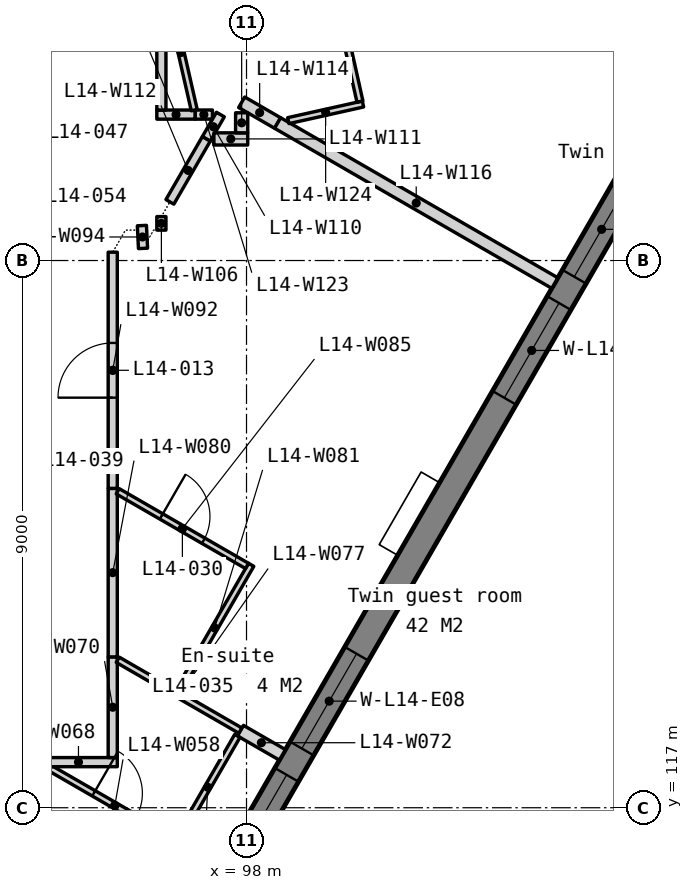
"""IFC4 building model, lengths in metres.
Left out: names, types, materials, properties, quantities, classifications, styles, units other than length and angle.
Written with IfcOpenShell. Run it as: python <this file> out.ifc"""

import sys

from ifc_helpers import new_model, si_unit, direction, frame, frame_2d, origin, place, context, subcontext, project, spatial, polyline, rectangle, outline, extrude, element, fill, save


model = new_model("IFC4")
c1 = context("Model", 3, precision=1e-05, world=origin(), true_north=direction((0.0, 1.0)))
c2 = subcontext(c1, "Body", "Model", "MODEL_VIEW")
j1 = project(units=[si_unit("LENGTHUNIT", "METRE"), si_unit("PLANEANGLEUNIT", "RADIAN")], contexts=[c1])
p1 = place(None, origin())
s1 = spatial("IfcSite", under=j1, at=p1, CompositionType="ELEMENT")
p2 = place(p1, origin())
s2 = spatial("IfcBuilding", under=s1, at=p2, CompositionType="ELEMENT")
p3 = place(p2, frame((0.0, 0.0, 63.0)))
s3 = spatial("IfcBuildingStorey", under=s2, at=p3, CompositionType="ELEMENT", Elevation=63.0)
p4 = place(p3, frame((0.0, 0.0, -0.15)))
e1 = element("IfcWall", 1, at=p4, inside=s3, PredefinedType="SOLIDWALL", context=c2, shape_type="SweptSolid", body=[
    extrude(outline(polyline([(105.7, 129.284), (105.31, 129.509), (105.18, 129.284), (102.14, 134.55), (102.4, 134.55), (102.4, 135.0), (105.7, 129.284)])), origin(), (0.0, 0.0, 1.0), 3.5),
])
p5 = place(p3, frame((83.105, 90.599, -0.15), z_axis=(0.0, 0.0, 1.0), x_axis=(0.499999201451, 0.866025864826, 0.0)))
e2 = element("IfcWall", 2, at=p5, inside=s3, PredefinedType="SOLIDWALL", context=c2, shape_type="SweptSolid", body=[
    extrude(outline(polyline([(44.8, 0.0), (44.8, 3.5), (0.0, 3.5), (0.0, 0.0), (44.8, 0.0)])), frame((0.0, 0.225, 0.0), z_axis=(0.0, -1.0, 0.0), x_axis=(1.0, 0.0, 0.0)), (0.0, 0.0, 1.0), 0.45),
])
p6 = place(p5, frame((2.43, 0.0, 1.05)))
e3 = element("IfcOpeningElement", 3, at=p6, cuts=e2, PredefinedType="OPENING", context=c2, shape_type="SweptSolid", body=[
    extrude(rectangle(XDim=1.8, YDim=1.5, at=frame_2d((0.9, 0.75))), frame((0.0, 0.235, 0.0), z_axis=(0.0, -1.0, 0.0), x_axis=(1.0, 0.0, 0.0)), (0.0, 0.0, 1.0), 0.47),
])
p7 = place(p5, frame((4.73, 0.0, 1.05)))
e4 = element("IfcOpeningElement", 4, at=p7, cuts=e2, PredefinedType="OPENING", context=c2, shape_type="SweptSolid", body=[
    extrude(rectangle(XDim=1.8, YDim=1.5, at=frame_2d((0.9, 0.75))), frame((0.0, 0.235, 0.0), z_axis=(0.0, -1.0, 0.0), x_axis=(1.0, 0.0, 0.0)), (0.0, 0.0, 1.0), 0.47),
])
p8 = place(p5, frame((11.39, 0.0, 1.05)))
e5 = element("IfcOpeningElement", 5, at=p8, cuts=e2, PredefinedType="OPENING", context=c2, shape_type="SweptSolid", body=[
    extrude(rectangle(XDim=1.8, YDim=1.5, at=frame_2d((0.9, 0.75))), frame((0.0, 0.235, 0.0), z_axis=(0.0, -1.0, 0.0), x_axis=(1.0, 0.0, 0.0)), (0.0, 0.0, 1.0), 0.47),
])
p9 = place(p5, frame((13.69, 0.0, 1.05)))
e6 = element("IfcOpeningElement", 6, at=p9, cuts=e2, PredefinedType="OPENING", context=c2, shape_type="SweptSolid", body=[
    extrude(rectangle(XDim=1.8, YDim=1.5, at=frame_2d((0.9, 0.75))), frame((0.0, 0.235, 0.0), z_axis=(0.0, -1.0, 0.0), x_axis=(1.0, 0.0, 0.0)), (0.0, 0.0, 1.0), 0.47),
])
p10 = place(p5, frame((20.35, 0.0, 1.05)))
e7 = element("IfcOpeningElement", 7, at=p10, cuts=e2, PredefinedType="OPENING", context=c2, shape_type="SweptSolid", body=[
    extrude(rectangle(XDim=1.8, YDim=1.5, at=frame_2d((0.9, 0.75))), frame((0.0, 0.235, 0.0), z_axis=(0.0, -1.0, 0.0), x_axis=(1.0, 0.0, 0.0)), (0.0, 0.0, 1.0), 0.47),
])
p11 = place(p5, frame((22.65, 0.0, 1.05)))
e8 = element("IfcOpeningElement", 8, at=p11, cuts=e2, PredefinedType="OPENING", context=c2, shape_type="SweptSolid", body=[
    extrude(rectangle(XDim=1.8, YDim=1.5, at=frame_2d((0.9, 0.75))), frame((0.0, 0.235, 0.0), z_axis=(0.0, -1.0, 0.0), x_axis=(1.0, 0.0, 0.0)), (0.0, 0.0, 1.0), 0.47),
])
p12 = place(p5, frame((29.31, 0.0, 1.05)))
e9 = element("IfcOpeningElement", 9, at=p12, cuts=e2, PredefinedType="OPENING", context=c2, shape_type="SweptSolid", body=[
    extrude(rectangle(XDim=1.8, YDim=1.5, at=frame_2d((0.9, 0.75))), frame((0.0, 0.235, 0.0), z_axis=(0.0, -1.0, 0.0), x_axis=(1.0, 0.0, 0.0)), (0.0, 0.0, 1.0), 0.47),
])
p13 = place(p5, frame((31.61, 0.0, 1.05)))
e10 = element("IfcOpeningElement", 10, at=p13, cuts=e2, PredefinedType="OPENING", context=c2, shape_type="SweptSolid", body=[
    extrude(rectangle(XDim=1.8, YDim=1.5, at=frame_2d((0.9, 0.75))), frame((0.0, 0.235, 0.0), z_axis=(0.0, -1.0, 0.0), x_axis=(1.0, 0.0, 0.0)), (0.0, 0.0, 1.0), 0.47),
])
p14 = place(p5, frame((38.27, 0.0, 1.05)))
e11 = element("IfcOpeningElement", 11, at=p14, cuts=e2, PredefinedType="OPENING", context=c2, shape_type="SweptSolid", body=[
    extrude(rectangle(XDim=1.8, YDim=1.5, at=frame_2d((0.9, 0.75))), frame((0.0, 0.235, 0.0), z_axis=(0.0, -1.0, 0.0), x_axis=(1.0, 0.0, 0.0)), (0.0, 0.0, 1.0), 0.47),
])
p15 = place(p5, frame((40.57, 0.0, 1.05)))
e12 = element("IfcOpeningElement", 12, at=p15, cuts=e2, PredefinedType="OPENING", context=c2, shape_type="SweptSolid", body=[
    extrude(rectangle(XDim=1.8, YDim=1.5, at=frame_2d((0.9, 0.75))), frame((0.0, 0.235, 0.0), z_axis=(0.0, -1.0, 0.0), x_axis=(1.0, 0.0, 0.0)), (0.0, 0.0, 1.0), 0.47),
])
p16 = place(p3, frame((0.0, 0.0, -0.15)))
e13 = element("IfcWall", 13, at=p16, inside=s3, PredefinedType="SOLIDWALL", context=c2, shape_type="SweptSolid", body=[
    extrude(outline(polyline([(105.7, 129.284), (106.507, 134.131), (102.4, 135.0), (105.7, 129.284)])), origin(), (0.0, 0.0, 1.0), 3.5),
])
p17 = place(p3, frame((90.751, 117.223, 0.0), z_axis=(0.0, 0.0, 1.0), x_axis=(0.866015162859, -0.500017737384, 0.0)))
e14 = element("IfcWall", 14, at=p17, inside=s3, PredefinedType="PARTITIONING", context=c2, shape_type="SweptSolid", body=[
    extrude(rectangle(XDim=6.465, YDim=0.2, at=frame_2d((3.232, 0.0))), origin(), (0.0, 0.0, 1.0), 3.35),
])
p18 = place(p3, frame((94.775, 117.647, 0.0), z_axis=(0.0, 0.0, 1.0), x_axis=(0.86604092097, -0.499973122483, 0.0)))
e15 = element("IfcWall", 15, at=p18, inside=s3, PredefinedType="PARTITIONING", context=c2, shape_type="SweptSolid", body=[
    extrude(rectangle(XDim=2.445, YDim=0.1, at=frame_2d((1.223, 0.0))), origin(), (0.0, 0.0, 1.0), 3.35),
])
p19 = place(p18, frame((0.823, 0.0, 0.0)))
e16 = element("IfcOpeningElement", 16, at=p19, cuts=e15, PredefinedType="OPENING", context=c2, shape_type="SweptSolid", body=[
    extrude(rectangle(XDim=0.8, YDim=2.1, at=frame_2d((0.4, 1.05))), frame((0.0, 0.06, 0.0), z_axis=(0.0, -1.0, 0.0), x_axis=(1.0, 0.0, 0.0)), (0.0, 0.0, 1.0), 0.12),
])
p20 = place(p3, frame((94.598, 117.75, 0.0), z_axis=(0.0, 0.0, 1.0), x_axis=(1.0, 0.0, 0.0)))
e17 = element("IfcWall", 17, at=p20, inside=s3, PredefinedType="PARTITIONING", context=c2, shape_type="SweptSolid", body=[
    extrude(rectangle(XDim=1.277, YDim=0.15, at=frame_2d((0.639, 0.0))), origin(), (0.0, 0.0, 1.0), 3.35),
])
p21 = place(p3, frame((95.8, 117.825, 0.0), z_axis=(0.0, 0.0, 1.0), x_axis=(0.0, 1.0, 0.0)))
e18 = element("IfcWall", 18, at=p21, inside=s3, PredefinedType="PARTITIONING", context=c2, shape_type="SweptSolid", body=[
    extrude(rectangle(XDim=1.656, YDim=0.15, at=frame_2d((0.828, 0.0))), origin(), (0.0, 0.0, 1.0), 3.35),
])
p22 = place(p3, frame((97.9, 118.269, 0.0), z_axis=(0.0, 0.0, 1.0), x_axis=(0.866068339032, -0.499925626596, 0.0)))
e19 = element("IfcWall", 19, at=p22, inside=s3, PredefinedType="PARTITIONING", context=c2, shape_type="SweptSolid", body=[
    extrude(rectangle(XDim=0.797, YDim=0.2, at=frame_2d((0.399, 0.0))), origin(), (0.0, 0.0, 1.0), 3.35),
])
p23 = place(p3, frame((96.875, 116.493, 0.0), z_axis=(0.0, 0.0, 1.0), x_axis=(0.500043961785, 0.866000020948, 0.0)))
e20 = element("IfcWall", 20, at=p23, inside=s3, PredefinedType="PARTITIONING", context=c2, shape_type="SweptSolid", body=[
    extrude(rectangle(XDim=1.95, YDim=0.1, at=frame_2d((0.975, 0.0))), origin(), (0.0, 0.0, 1.0), 3.35),
])
p24 = place(p3, frame((95.882, 119.433, 0.0), z_axis=(0.0, 0.0, 1.0), x_axis=(0.866009305107, -0.50002788269, 0.0)))
e21 = element("IfcWall", 21, at=p24, inside=s3, PredefinedType="PARTITIONING", context=c2, shape_type="SweptSolid", body=[
    extrude(rectangle(XDim=2.329, YDim=0.1, at=frame_2d((1.165, 0.0))), origin(), (0.0, 0.0, 1.0), 3.35),
])
p25 = place(p3, frame((95.8, 119.481, 0.0), z_axis=(0.0, 0.0, 1.0), x_axis=(0.0, 1.0, 0.0)))
e22 = element("IfcWall", 22, at=p25, inside=s3, PredefinedType="PARTITIONING", context=c2, shape_type="SweptSolid", body=[
    extrude(rectangle(XDim=2.771, YDim=0.15, at=frame_2d((1.386, 0.0))), origin(), (0.0, 0.0, 1.0), 3.35),
])
p26 = place(p3, frame((96.877, 118.917, 0.0), z_axis=(0.0, 0.0, 1.0), x_axis=(0.500001309137, 0.866024647952, 0.0)))
e23 = element("IfcWall", 23, at=p26, inside=s3, PredefinedType="PARTITIONING", context=c2, shape_type="SweptSolid", body=[
    extrude(rectangle(XDim=2.4, YDim=0.1, at=frame_2d((1.2, 0.0))), origin(), (0.0, 0.0, 1.0), 3.35),
])
p27 = place(p3, frame((95.882, 122.205, 0.0), z_axis=(0.0, 0.0, 1.0), x_axis=(0.866006720078, -0.500032359733, 0.0)))
e24 = element("IfcWall", 24, at=p27, inside=s3, PredefinedType="PARTITIONING", context=c2, shape_type="SweptSolid", body=[
    extrude(rectangle(XDim=2.455, YDim=0.1, at=frame_2d((1.228, 0.0))), origin(), (0.0, 0.0, 1.0), 3.35),
])
p28 = place(p27, frame((0.827, 0.0, 0.0)))
e25 = element("IfcOpeningElement", 25, at=p28, cuts=e24, PredefinedType="OPENING", context=c2, shape_type="SweptSolid", body=[
    extrude(rectangle(XDim=0.8, YDim=2.1, at=frame_2d((0.4, 1.05))), frame((0.0, 0.06, 0.0), z_axis=(0.0, -1.0, 0.0), x_axis=(1.0, 0.0, 0.0)), (0.0, 0.0, 1.0), 0.12),
])
p29 = place(p3, frame((95.8, 122.252, 0.0), z_axis=(0.0, 0.0, 1.0), x_axis=(0.0, 1.0, 0.0)))
e26 = element("IfcWall", 26, at=p29, inside=s3, PredefinedType="PARTITIONING", context=c2, shape_type="SweptSolid", body=[
    extrude(rectangle(XDim=3.885, YDim=0.15, at=frame_2d((1.942, 0.0))), origin(), (0.0, 0.0, 1.0), 3.35),
])
p30 = place(p29, frame((1.492, 0.0, 0.0)))
e27 = element("IfcOpeningElement", 27, at=p30, cuts=e26, PredefinedType="OPENING", context=c2, shape_type="SweptSolid", body=[
    extrude(rectangle(XDim=0.9, YDim=2.1, at=frame_2d((0.45, 1.05))), frame((0.0, 0.085, 0.0), z_axis=(0.0, -1.0, 0.0), x_axis=(1.0, 0.0, 0.0)), (0.0, 0.0, 1.0), 0.17),
])
p31 = place(p3, frame((96.28, 126.575, 0.0), z_axis=(0.0, 0.0, 1.0), x_axis=(0.049354603538, -0.998781318963, 0.0)))
e28 = element("IfcWall", 28, at=p31, inside=s3, PredefinedType="PARTITIONING", context=c2, shape_type="SweptSolid", body=[
    extrude(rectangle(XDim=0.376, YDim=0.15, at=frame_2d((0.188, 0.0))), origin(), (0.0, 0.0, 1.0), 3.35),
])
p32 = place(p3, frame((96.6, 126.5, 0.0), z_axis=(0.0, 0.0, 1.0), x_axis=(0.0, 1.0, 0.0)))
e29 = element("IfcWall", 29, at=p32, inside=s3, PredefinedType="PARTITIONING", context=c2, shape_type="SweptSolid", body=[
    extrude(rectangle(XDim=0.223, YDim=0.15, at=frame_2d((0.111, 0.0))), origin(), (0.0, 0.0, 1.0), 3.35),
])
p33 = place(p3, frame((97.339, 128.0, 0.0), z_axis=(0.0, 0.0, 1.0), x_axis=(0.500391795928, 0.865799082101, 0.0)))
e30 = element("IfcWall", 30, at=p33, inside=s3, PredefinedType="PARTITIONING", context=c2, shape_type="SweptSolid", body=[
    extrude(rectangle(XDim=0.463, YDim=0.15, at=frame_2d((0.231, 0.0))), origin(), (0.0, 0.0, 1.0), 3.35),
])
p34 = place(p3, frame((97.464, 128.0, 0.0), z_axis=(0.0, 0.0, 1.0), x_axis=(1.0, 0.0, 0.0)))
e31 = element("IfcWall", 31, at=p34, inside=s3, PredefinedType="PARTITIONING", context=c2, shape_type="SweptSolid", body=[
    extrude(rectangle(XDim=0.556, YDim=0.2, at=frame_2d((0.278, 0.0))), origin(), (0.0, 0.0, 1.0), 2.938),
])
p35 = place(p3, frame((96.74, 126.965, 0.0), z_axis=(0.0, 0.0, 1.0), x_axis=(0.500529245116, 0.865719628277, 0.0)))
e32 = element("IfcWall", 32, at=p35, inside=s3, PredefinedType="PARTITIONING", context=c2, shape_type="SweptSolid", body=[
    extrude(rectangle(XDim=1.196, YDim=0.15, at=frame_2d((0.598, 0.0))), origin(), (0.0, 0.0, 1.0), 3.35),
])
p36 = place(p3, frame((97.921, 128.603, 0.0), z_axis=(0.0, 0.0, 1.0), x_axis=(0.865989003036, -0.500063042646, 0.0)))
e33 = element("IfcWall", 33, at=p36, inside=s3, PredefinedType="PARTITIONING", context=c2, shape_type="SweptSolid", body=[
    extrude(rectangle(XDim=0.683, YDim=0.2, at=frame_2d((0.341, 0.0))), origin(), (0.0, 0.0, 1.0), 3.35),
])
p37 = place(p3, frame((98.512, 128.261, 0.0), z_axis=(0.0, 0.0, 1.0), x_axis=(0.866031112038, -0.499990112884, 0.0)))
e34 = element("IfcWall", 34, at=p37, inside=s3, PredefinedType="PARTITIONING", context=c2, shape_type="SweptSolid", body=[
    extrude(rectangle(XDim=5.264, YDim=0.2, at=frame_2d((2.632, 0.0))), origin(), (0.0, 0.0, 1.0), 3.35),
])
p38 = place(p3, frame((96.525, 128.4, 0.0), z_axis=(0.0, 0.0, 1.0), x_axis=(1.0, 0.0, 0.0)))
e35 = element("IfcWall", 35, at=p38, inside=s3, PredefinedType="PARTITIONING", context=c2, shape_type="SweptSolid", body=[
    extrude(rectangle(XDim=0.633, YDim=0.15, at=frame_2d((0.316, 0.0))), origin(), (0.0, 0.0, 1.0), 3.35),
])
p39 = place(p3, frame((96.708, 130.37, 0.0), z_axis=(0.0, 0.0, 1.0), x_axis=(0.222402197424, -0.974955005413, 0.0)))
e36 = element("IfcWall", 36, at=p39, inside=s3, PredefinedType="PARTITIONING", context=c2, shape_type="SweptSolid", body=[
    extrude(rectangle(XDim=1.945, YDim=0.1, at=frame_2d((0.973, 0.0))), origin(), (0.0, 0.0, 1.0), 3.35),
])
p40 = place(p3, frame((97.157, 128.4, 0.0), z_axis=(0.0, 0.0, 1.0), x_axis=(0.999996638419, 0.002592903989, 0.0)))
e37 = element("IfcWall", 37, at=p40, inside=s3, PredefinedType="PARTITIONING", context=c2, shape_type="SweptSolid", body=[
    extrude(rectangle(XDim=0.282, YDim=0.15, at=frame_2d((0.141, 0.0))), origin(), (0.0, 0.0, 1.0), 3.35),
])
p41 = place(p3, frame((98.687, 128.301, 0.0), z_axis=(0.0, 0.0, 1.0), x_axis=(0.976063649291, 0.217485062782, 0.0)))
e38 = element("IfcWall", 38, at=p41, inside=s3, PredefinedType="PARTITIONING", context=c2, shape_type="SweptSolid", body=[
    extrude(rectangle(XDim=1.258, YDim=0.1, at=frame_2d((0.629, 0.0))), origin(), (0.0, 0.0, 1.0), 3.35),
])
p42 = place(p3, frame((97.92, 128.1, 0.0), z_axis=(0.0, 0.0, 1.0), x_axis=(0.000740740538, 0.999999725652, 0.0)))
e39 = element("IfcWall", 39, at=p42, inside=s3, PredefinedType="PARTITIONING", context=c2, shape_type="SweptSolid", body=[
    extrude(rectangle(XDim=0.33, YDim=0.2, at=frame_2d((0.165, 0.0))), origin(), (0.0, 0.0, 1.0), 3.35),
])
p43 = place(p3, frame((99.365, 130.859, 0.0), z_axis=(0.0, 0.0, 1.0), x_axis=(0.217402503607, -0.97608204134, 0.0)))
e40 = element("IfcWall", 40, at=p43, inside=s3, PredefinedType="PARTITIONING", context=c2, shape_type="SweptSolid", body=[
    extrude(rectangle(XDim=2.3, YDim=0.1, at=frame_2d((1.15, 0.0))), origin(), (0.0, 0.0, 1.0), 3.35),
])
p44 = place(p3, frame((96.6, 128.475, 0.0), z_axis=(0.0, 0.0, 1.0), x_axis=(0.0, 1.0, 0.0)))
e41 = element("IfcWall", 41, at=p44, inside=s3, PredefinedType="PARTITIONING", context=c2, shape_type="SweptSolid", body=[
    extrude(rectangle(XDim=5.599, YDim=0.15, at=frame_2d((2.8, 0.0))), origin(), (0.0, 0.0, 1.0), 3.35),
])
p45 = place(p44, frame((2.35, 0.0, 0.0)))
e42 = element("IfcOpeningElement", 42, at=p45, cuts=e41, PredefinedType="OPENING", context=c2, shape_type="SweptSolid", body=[
    extrude(rectangle(XDim=0.9, YDim=2.1, at=frame_2d((0.45, 1.05))), frame((0.0, 0.085, 0.0), z_axis=(0.0, -1.0, 0.0), x_axis=(1.0, 0.0, 0.0)), (0.0, 0.0, 1.0), 0.17),
])
p46 = place(p12, origin())
e43 = element("IfcWindow", 43, at=p46, inside=s3, PartitioningType="SINGLE_PANEL", PredefinedType="WINDOW", context=c2, shape_type="SweptSolid", body=[
    extrude(rectangle(XDim=1.8, YDim=1.5, at=frame_2d((0.9, 0.75))), frame((0.0, 0.03, 0.0), z_axis=(0.0, -1.0, 0.0), x_axis=(1.0, 0.0, 0.0)), (0.0, 0.0, 1.0), 0.06),
])
fill(e9, e43)
p47 = place(p13, origin())
e44 = element("IfcWindow", 44, at=p47, inside=s3, PartitioningType="SINGLE_PANEL", PredefinedType="WINDOW", context=c2, shape_type="SweptSolid", body=[
    extrude(rectangle(XDim=1.8, YDim=1.5, at=frame_2d((0.9, 0.75))), frame((0.0, 0.03, 0.0), z_axis=(0.0, -1.0, 0.0), x_axis=(1.0, 0.0, 0.0)), (0.0, 0.0, 1.0), 0.06),
])
fill(e10, e44)
p48 = place(p14, origin())
e45 = element("IfcWindow", 45, at=p48, inside=s3, PartitioningType="SINGLE_PANEL", PredefinedType="WINDOW", context=c2, shape_type="SweptSolid", body=[
    extrude(rectangle(XDim=1.8, YDim=1.5, at=frame_2d((0.9, 0.75))), frame((0.0, 0.03, 0.0), z_axis=(0.0, -1.0, 0.0), x_axis=(1.0, 0.0, 0.0)), (0.0, 0.0, 1.0), 0.06),
])
fill(e11, e45)
p49 = place(p15, origin())
e46 = element("IfcWindow", 46, at=p49, inside=s3, PartitioningType="SINGLE_PANEL", PredefinedType="WINDOW", context=c2, shape_type="SweptSolid", body=[
    extrude(rectangle(XDim=1.8, YDim=1.5, at=frame_2d((0.9, 0.75))), frame((0.0, 0.03, 0.0), z_axis=(0.0, -1.0, 0.0), x_axis=(1.0, 0.0, 0.0)), (0.0, 0.0, 1.0), 0.06),
])
fill(e12, e46)
p50 = place(p30, origin())
e47 = element("IfcDoor", 47, at=p50, inside=s3, OperationType="SINGLE_SWING_LEFT", PredefinedType="DOOR", context=c2, shape_type="SweptSolid", body=[
    extrude(rectangle(XDim=0.9, YDim=2.1, at=frame_2d((0.45, 1.05))), frame((0.0, 0.025, 0.0), z_axis=(0.0, -1.0, 0.0), x_axis=(1.0, 0.0, 0.0)), (0.0, 0.0, 1.0), 0.05),
])
fill(e27, e47)
p51 = place(p19, origin())
e48 = element("IfcDoor", 48, at=p51, inside=s3, OperationType="SINGLE_SWING_LEFT", PredefinedType="DOOR", context=c2, shape_type="SweptSolid", body=[
    extrude(rectangle(XDim=0.8, YDim=2.1, at=frame_2d((0.4, 1.05))), frame((0.0, 0.025, 0.0), z_axis=(0.0, -1.0, 0.0), x_axis=(1.0, 0.0, 0.0)), (0.0, 0.0, 1.0), 0.05),
])
fill(e16, e48)
p52 = place(p28, origin())
e49 = element("IfcDoor", 49, at=p52, inside=s3, OperationType="SINGLE_SWING_LEFT", PredefinedType="DOOR", context=c2, shape_type="SweptSolid", body=[
    extrude(rectangle(XDim=0.8, YDim=2.1, at=frame_2d((0.4, 1.05))), frame((0.0, 0.025, 0.0), z_axis=(0.0, -1.0, 0.0), x_axis=(1.0, 0.0, 0.0)), (0.0, 0.0, 1.0), 0.05),
])
fill(e25, e49)
save(model, sys.argv[1])
